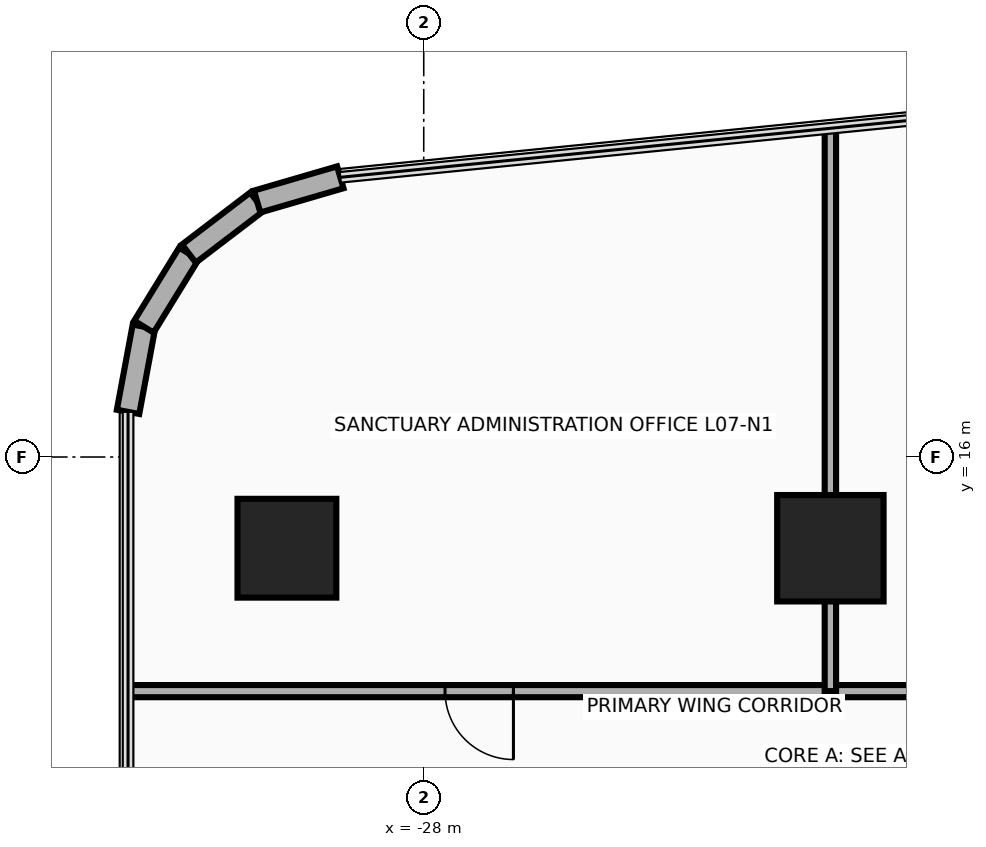
"""IFC4 building model, lengths in metres.
Left out: names, types, materials, properties, quantities, classifications, styles, units other than length and angle.
Written with IfcOpenShell. Run it as: python <this file> out.ifc"""

import sys

from ifc_helpers import new_model, si_unit, direction, frame, frame_2d, origin, origin_2d, place, context, subcontext, project, spatial, rectangle, circle, extrude, source, transform, mapped, element, fill, save


model = new_model("IFC4")
c1 = context("Model", 3, precision=1e-05, world=origin(), true_north=direction((0.0, 1.0)))
c2 = subcontext(c1, "Body", "Model", "MODEL_VIEW")
j1 = project(units=[si_unit("LENGTHUNIT", "METRE"), si_unit("PLANEANGLEUNIT", "RADIAN")], contexts=[c1])
p1 = place(None, origin())
s1 = spatial("IfcSite", under=j1, at=p1, CompositionType="ELEMENT")
p2 = place(p1, origin())
s2 = spatial("IfcBuilding", under=s1, at=p2, CompositionType="ELEMENT")
p3 = place(p2, frame((0.0, 0.0, 33.4)))
s3 = spatial("IfcBuildingStorey", under=s2, at=p3, CompositionType="ELEMENT", Elevation=33.4)
m1 = source(origin(), c2, "Body", "SweptSolid", [
    extrude(circle(Radius=0.65, at=origin_2d()), origin(), (0.0, 0.0, 1.0), 3.7),
])
p4 = place(p3, frame((-29.8, 14.8, 0.0), z_axis=(0.0, 0.0, 1.0), x_axis=(1.0, 0.0, 0.0)))
e1 = element("IfcColumn", 1, at=p4, inside=s3, PredefinedType="COLUMN", context=c2, shape_type="MappedRepresentation", body=[
    mapped(m1, transform((0.0, 0.0, 0.0), x_axis=(1.0, 0.0, 0.0), y_axis=(0.0, 1.0, 0.0), z_axis=(0.0, 0.0, 1.0), scale=1.0)),
])
m2 = source(origin(), c2, "Body", "SweptSolid", [
    extrude(rectangle(XDim=1.4, YDim=1.4, at=origin_2d()), origin(), (0.0, 0.0, 1.0), 3.7),
])
p5 = place(p3, frame((-22.65, 14.8, 0.0), z_axis=(0.0, 0.0, 1.0), x_axis=(1.0, 0.0, 0.0)))
e2 = element("IfcColumn", 2, at=p5, inside=s3, PredefinedType="COLUMN", context=c2, shape_type="MappedRepresentation", body=[
    mapped(m2, transform((0.0, 0.0, 0.0), x_axis=(1.0, 0.0, 0.0), y_axis=(0.0, 1.0, 0.0), z_axis=(0.0, 0.0, 1.0), scale=1.0)),
])
p6 = place(p3, frame((-31.89, 16.594, 0.0), z_axis=(0.0, 0.0, 1.0), x_axis=(0.182748995683, 0.9831596028, 0.0)))
e3 = element("IfcWall", 3, at=p6, inside=s3, PredefinedType="SOLIDWALL", context=c2, shape_type="SweptSolid", body=[
    extrude(rectangle(XDim=1.14, YDim=0.3, at=frame_2d((0.57, 0.0))), origin(), (0.0, 0.0, 1.0), 3.46),
])
p7 = place(p3, frame((-31.682, 17.714, 0.0), z_axis=(0.0, 0.0, 1.0), x_axis=(0.524157723014, 0.8516212077, 0.0)))
e4 = element("IfcWall", 4, at=p7, inside=s3, PredefinedType="SOLIDWALL", context=c2, shape_type="SweptSolid", body=[
    extrude(rectangle(XDim=1.129, YDim=0.3, at=frame_2d((0.565, 0.0))), origin(), (0.0, 0.0, 1.0), 3.46),
])
p8 = place(p3, frame((-31.09, 18.676, 0.0), z_axis=(0.0, 0.0, 1.0), x_axis=(0.795253002434, 0.606277710393, 0.0)))
e5 = element("IfcWall", 5, at=p8, inside=s3, PredefinedType="SOLIDWALL", context=c2, shape_type="SweptSolid", body=[
    extrude(rectangle(XDim=1.129, YDim=0.3, at=frame_2d((0.564, 0.0))), origin(), (0.0, 0.0, 1.0), 3.46),
])
p9 = place(p3, frame((-30.192, 19.361, 0.0), z_axis=(0.0, 0.0, 1.0), x_axis=(0.960071941549, 0.279753225271, 0.0)))
e6 = element("IfcWall", 6, at=p9, inside=s3, PredefinedType="SOLIDWALL", context=c2, shape_type="SweptSolid", body=[
    extrude(rectangle(XDim=1.14, YDim=0.3, at=frame_2d((0.57, 0.0))), origin(), (0.0, 0.0, 1.0), 3.46),
])
p10 = place(p3, frame((-31.89, 12.92, 0.0), z_axis=(0.0, 0.0, 1.0), x_axis=(1.0, 0.0, 0.0)))
e7 = element("IfcWall", 7, at=p10, inside=s3, PredefinedType="PARTITIONING", context=c2, shape_type="SweptSolid", body=[
    extrude(rectangle(XDim=45.44, YDim=0.16, at=frame_2d((22.72, 0.0))), origin(), (0.0, 0.0, 1.0), 2.583),
])
p11 = place(p10, frame((4.17, 0.0, 0.0)))
e8 = element("IfcOpeningElement", 8, at=p11, cuts=e7, PredefinedType="OPENING", context=c2, shape_type="SweptSolid", body=[
    extrude(rectangle(XDim=0.9, YDim=2.1, at=frame_2d((0.45, 1.05))), frame((0.0, 0.095, 0.0), z_axis=(0.0, -1.0, 0.0), x_axis=(1.0, 0.0, 0.0)), (0.0, 0.0, 1.0), 0.19),
])
p12 = place(p10, frame((13.915, 0.0, 0.0)))
e9 = element("IfcOpeningElement", 9, at=p12, cuts=e7, PredefinedType="OPENING", context=c2, shape_type="SweptSolid", body=[
    extrude(rectangle(XDim=0.9, YDim=2.1, at=frame_2d((0.45, 1.05))), frame((0.0, 0.095, 0.0), z_axis=(0.0, -1.0, 0.0), x_axis=(1.0, 0.0, 0.0)), (0.0, 0.0, 1.0), 0.19),
])
p13 = place(p10, frame((23.24, 0.0, 0.0)))
e10 = element("IfcOpeningElement", 10, at=p13, cuts=e7, PredefinedType="OPENING", context=c2, shape_type="SweptSolid", body=[
    extrude(rectangle(XDim=0.9, YDim=2.1, at=frame_2d((0.45, 1.05))), frame((0.0, 0.095, 0.0), z_axis=(0.0, -1.0, 0.0), x_axis=(1.0, 0.0, 0.0)), (0.0, 0.0, 1.0), 0.19),
])
p14 = place(p10, frame((31.44, 0.0, 0.0)))
e11 = element("IfcOpeningElement", 11, at=p14, cuts=e7, PredefinedType="OPENING", context=c2, shape_type="SweptSolid", body=[
    extrude(rectangle(XDim=0.9, YDim=2.1, at=frame_2d((0.45, 1.05))), frame((0.0, 0.095, 0.0), z_axis=(0.0, -1.0, 0.0), x_axis=(1.0, 0.0, 0.0)), (0.0, 0.0, 1.0), 0.19),
])
p15 = place(p10, frame((40.215, 0.0, 0.0)))
e12 = element("IfcOpeningElement", 12, at=p15, cuts=e7, PredefinedType="OPENING", context=c2, shape_type="SweptSolid", body=[
    extrude(rectangle(XDim=0.9, YDim=2.1, at=frame_2d((0.45, 1.05))), frame((0.0, 0.095, 0.0), z_axis=(0.0, -1.0, 0.0), x_axis=(1.0, 0.0, 0.0)), (0.0, 0.0, 1.0), 0.19),
])
p16 = place(p3, frame((-22.65, 12.92, 0.0), z_axis=(0.0, 0.0, 1.0), x_axis=(0.0, 1.0, 0.0)))
e13 = element("IfcWall", 13, at=p16, inside=s3, PredefinedType="PARTITIONING", context=c2, shape_type="SweptSolid", body=[
    extrude(rectangle(XDim=7.405, YDim=0.15, at=frame_2d((3.702, 0.0))), origin(), (0.0, 0.0, 1.0), 2.583),
])
p17 = place(p11, frame((0.9, 0.0, 0.0), z_axis=(0.0, 0.0, 1.0), x_axis=(-1.0, 0.0, 0.0)))
e14 = element("IfcDoor", 14, at=p17, inside=s3, OperationType="SINGLE_SWING_LEFT", PredefinedType="DOOR", context=c2, shape_type="SweptSolid", body=[
    extrude(rectangle(XDim=0.9, YDim=2.1, at=frame_2d((0.45, 1.05))), frame((0.0, 0.025, 0.0), z_axis=(0.0, -1.0, 0.0), x_axis=(1.0, 0.0, 0.0)), (0.0, 0.0, 1.0), 0.05),
])
fill(e8, e14)
save(model, sys.argv[1])
